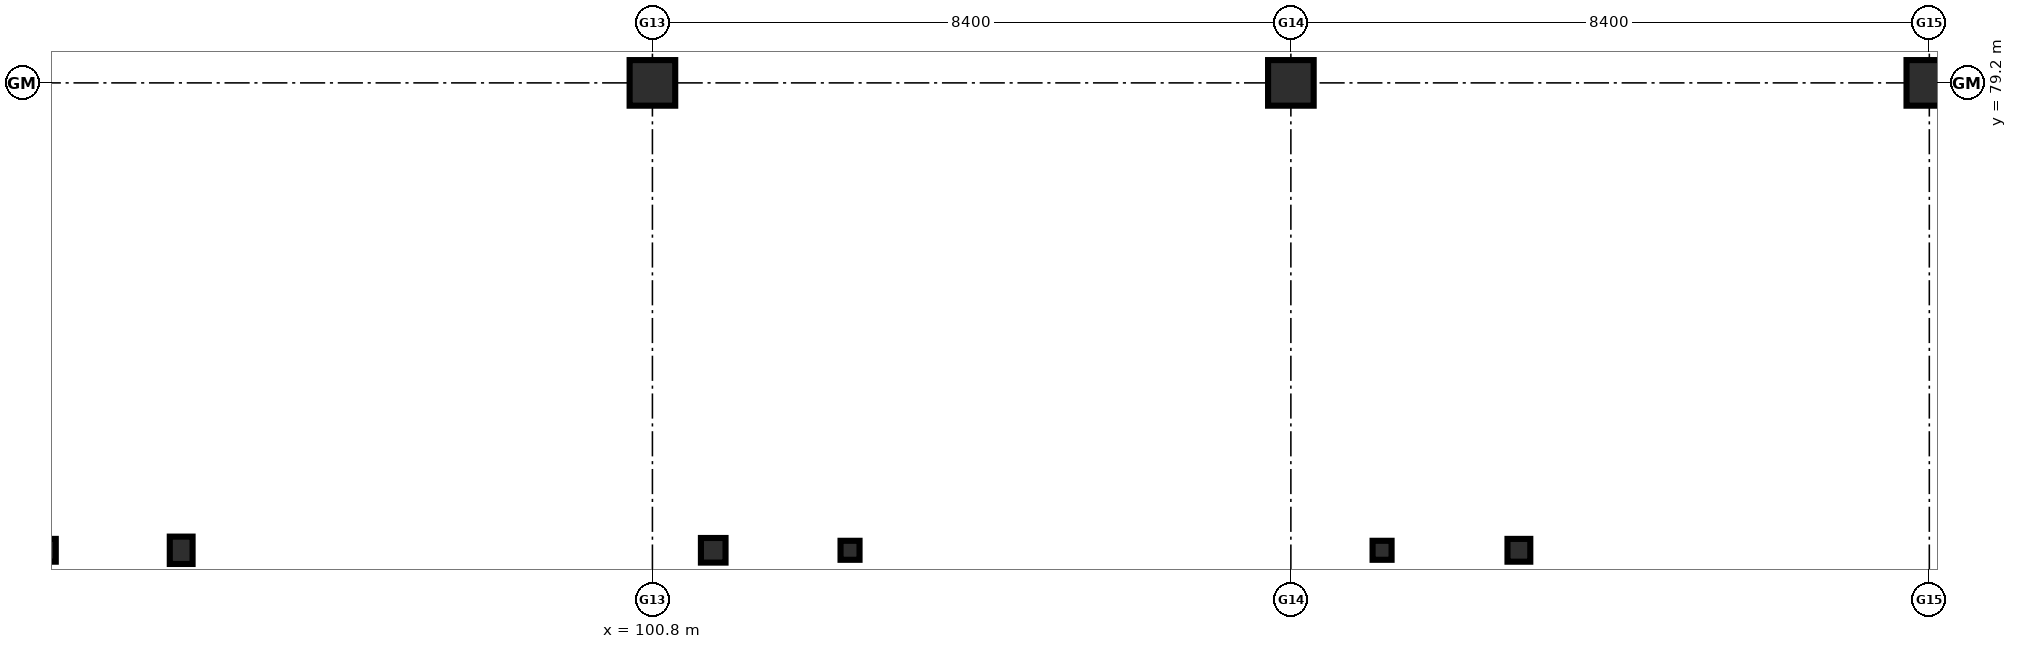
"""IFC4 building model, lengths in metres.
Left out: names, types, materials, properties, quantities, classifications, styles, units other than length and angle.
Written with IfcOpenShell. Run it as: python <this file> out.ifc"""

import sys

from ifc_helpers import new_model, si_unit, direction, frame, origin, origin_2d, place, context, subcontext, project, spatial, rectangle, hollow_rectangle, hollow_circle, i_section, extrude, element, save


model = new_model("IFC4")
c1 = context("Model", 3, precision=1e-05, world=origin(), true_north=direction((0.0, 1.0)))
c2 = subcontext(c1, "Body", "Model", "MODEL_VIEW")
j1 = project(units=[si_unit("LENGTHUNIT", "METRE"), si_unit("PLANEANGLEUNIT", "RADIAN")], contexts=[c1])
p1 = place(None, origin())
s1 = spatial("IfcSite", under=j1, at=p1, CompositionType="ELEMENT")
p2 = place(p1, origin())
s2 = spatial("IfcBuilding", under=s1, at=p2, CompositionType="ELEMENT")
p3 = place(p2, frame((0.0, 0.0, -4.8)))
s3 = spatial("IfcBuildingStorey", under=s2, at=p3, CompositionType="ELEMENT", Elevation=-4.8)
for number, where, z_axis, x_axis in (
    (1, (100.8, 79.2, 0.0), (0.0, 0.0, 1.0), (1.0, 0.0, 0.0)),
    (2, (109.2, 79.2, 0.0), (0.0, 0.0, 1.0), (1.0, 0.0, 0.0)),
    (3, (117.6, 79.2, 0.0), (0.0, 0.0, 1.0), (1.0, 0.0, 0.0)),
):
    element("IfcColumn", number, at=place(p3, frame(where, z_axis=z_axis, x_axis=x_axis)), inside=s3, PredefinedType="COLUMN", context=c2, shape_type="SweptSolid", body=[
        extrude(rectangle(XDim=0.6, YDim=0.6, at=origin_2d()), origin(), (0.0, 0.0, 1.0), 4.8),
    ])
p4 = place(p3, frame((112.2, 73.05, 0.0), z_axis=(0.0, 0.0, 1.0), x_axis=(1.0, 0.0, 0.0)))
e4 = element("IfcColumn", 4, at=p4, inside=s3, PredefinedType="COLUMN", context=c2, shape_type="SweptSolid", body=[
    extrude(i_section(OverallWidth=0.3, OverallDepth=0.3, WebThickness=0.011, FlangeThickness=0.019, FilletRadius=0.027, at=origin_2d()), origin(), (0.0, 0.0, 1.0), 4.8),
])
for number, where, z_axis, x_axis in (
    (5, (110.4, 73.05, 0.0), (0.0, 0.0, 1.0), (1.0, 0.0, 0.0)),
    (6, (103.4, 73.05, 0.0), (0.0, 0.0, 1.0), (1.0, 0.0, 0.0)),
):
    element("IfcColumn", number, at=place(p3, frame(where, z_axis=z_axis, x_axis=x_axis)), inside=s3, PredefinedType="COLUMN", context=c2, shape_type="SweptSolid", body=[
        extrude(hollow_rectangle(XDim=0.25, YDim=0.25, WallThickness=0.01, at=origin_2d()), origin(), (0.0, 0.0, 1.0), 4.8),
    ])
p5 = place(p3, frame((101.6, 73.05, 0.0), z_axis=(0.0, 0.0, 1.0), x_axis=(1.0, 0.0, 0.0)))
e7 = element("IfcColumn", 7, at=p5, inside=s3, PredefinedType="COLUMN", context=c2, shape_type="SweptSolid", body=[
    extrude(hollow_circle(Radius=0.162, WallThickness=0.012, at=origin_2d()), origin(), (0.0, 0.0, 1.0), 4.8),
])
p6 = place(p3, frame((94.6, 73.05, 0.0), z_axis=(0.0, 0.0, 1.0), x_axis=(1.0, 0.0, 0.0)))
e8 = element("IfcColumn", 8, at=p6, inside=s3, PredefinedType="COLUMN", context=c2, shape_type="SweptSolid", body=[
    extrude(i_section(OverallWidth=0.3, OverallDepth=0.36, WebThickness=0.012, FlangeThickness=0.022, FilletRadius=0.027, at=origin_2d()), origin(), (0.0, 0.0, 1.0), 4.8),
])
p7 = place(p3, frame((92.8, 73.05, 0.0), z_axis=(0.0, 0.0, 1.0), x_axis=(1.0, 0.0, 0.0)))
e9 = element("IfcColumn", 9, at=p7, inside=s3, PredefinedType="COLUMN", context=c2, shape_type="SweptSolid", body=[
    extrude(i_section(OverallWidth=0.3, OverallDepth=0.3, WebThickness=0.011, FlangeThickness=0.019, FilletRadius=0.027, at=origin_2d()), origin(), (0.0, 0.0, 1.0), 4.8),
])
save(model, sys.argv[1])
